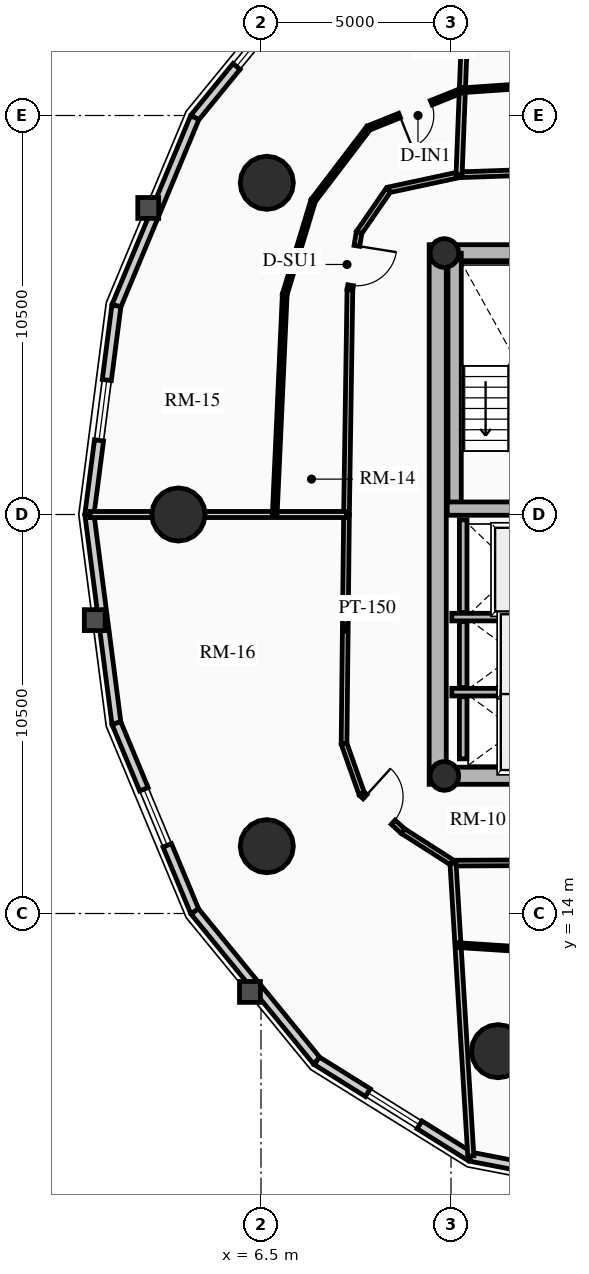
"""IFC4 building model, lengths in metres.
Left out: names, types, materials, properties, quantities, classifications, styles, units other than length and angle.
Written with IfcOpenShell. Run it as: python <this file> out.ifc"""

import sys

from ifc_helpers import new_model, si_unit, direction, frame, frame_2d, origin, origin_2d, place, context, subcontext, project, spatial, rectangle, circle, hollow_circle, extrude, source, transform, mapped, element, fill, save


model = new_model("IFC4")
c1 = context("Model", 3, precision=1e-05, world=origin(), true_north=direction((0.0, 1.0)))
c2 = subcontext(c1, "Body", "Model", "MODEL_VIEW")
j1 = project(units=[si_unit("LENGTHUNIT", "METRE"), si_unit("PLANEANGLEUNIT", "RADIAN")], contexts=[c1])
p1 = place(None, origin())
s1 = spatial("IfcSite", under=j1, at=p1, CompositionType="ELEMENT")
p2 = place(p1, origin())
s2 = spatial("IfcBuilding", under=s1, at=p2, CompositionType="ELEMENT")
p3 = place(p2, frame((0.0, 0.0, 144.04)))
s3 = spatial("IfcBuildingStorey", under=s2, at=p3, CompositionType="ELEMENT", Elevation=144.04)
p4 = place(p3, frame((11.15, 17.4, 0.0), z_axis=(0.0, 0.0, 1.0), x_axis=(0.0, 1.0, 0.0)))
e1 = element("IfcWall", 1, at=p4, inside=s3, PredefinedType="SHEAR", context=c2, shape_type="SweptSolid", body=[
    extrude(rectangle(XDim=14.2, YDim=0.45, at=frame_2d((7.1, 0.0))), origin(), (0.0, 0.0, 1.0), 3.06),
])
p5 = place(p3, frame((11.15, 17.625, 0.0), z_axis=(0.0, 0.0, 1.0), x_axis=(1.0, 0.0, 0.0)))
e2 = element("IfcWall", 2, at=p5, inside=s3, PredefinedType="SHEAR", context=c2, shape_type="SweptSolid", body=[
    extrude(rectangle(XDim=10.7, YDim=0.45, at=frame_2d((5.35, 0.0))), origin(), (0.0, 0.0, 1.0), 3.06),
])
m1 = source(origin(), c2, "Body", "SweptSolid", [
    extrude(rectangle(XDim=1.5, YDim=2.02, at=frame_2d((0.75, 1.01))), frame((0.0, 0.235, 0.0), z_axis=(0.0, -1.0, 0.0), x_axis=(1.0, 0.0, 0.0)), (0.0, 0.0, 1.0), 0.47),
])
p6 = place(p5, frame((5.45, 0.0, 0.0)))
e3 = element("IfcOpeningElement", 3, at=p6, cuts=e2, PredefinedType="OPENING", context=c2, shape_type="MappedRepresentation", body=[
    mapped(m1, transform((0.0, 0.0, 0.0), x_axis=(1.0, 0.0, 0.0), y_axis=(0.0, 1.0, 0.0), z_axis=(0.0, 0.0, 1.0), scale=1.0)),
])
p7 = place(p3, frame((11.15, 31.375, 0.0), z_axis=(0.0, 0.0, 1.0), x_axis=(1.0, 0.0, 0.0)))
e4 = element("IfcWall", 4, at=p7, inside=s3, PredefinedType="SHEAR", context=c2, shape_type="SweptSolid", body=[
    extrude(rectangle(XDim=10.7, YDim=0.45, at=frame_2d((5.35, 0.0))), origin(), (0.0, 0.0, 1.0), 3.06),
])
p8 = place(p7, frame((4.6, 0.0, 0.0)))
e5 = element("IfcOpeningElement", 5, at=p8, cuts=e4, PredefinedType="OPENING", context=c2, shape_type="MappedRepresentation", body=[
    mapped(m1, transform((0.0, 0.0, 0.0), x_axis=(1.0, 0.0, 0.0), y_axis=(0.0, 1.0, 0.0), z_axis=(0.0, 0.0, 1.0), scale=1.0)),
])
p9 = place(p3, frame((11.595, 24.655, 0.0), z_axis=(0.0, 0.0, 1.0), x_axis=(0.0, 1.0, 0.0)))
e6 = element("IfcWall", 6, at=p9, inside=s3, PredefinedType="SHEAR", context=c2, shape_type="SweptSolid", body=[
    extrude(rectangle(XDim=6.72, YDim=0.35, at=frame_2d((3.36, 0.0))), origin(), (0.0, 0.0, 1.0), 3.06),
])
p10 = place(p3, frame((11.4, 24.655, 0.0), z_axis=(0.0, 0.0, 1.0), x_axis=(1.0, 0.0, 0.0)))
e7 = element("IfcWall", 7, at=p10, inside=s3, PredefinedType="SHEAR", context=c2, shape_type="SweptSolid", body=[
    extrude(rectangle(XDim=3.285, YDim=0.35, at=frame_2d((1.643, 0.0))), origin(), (0.0, 0.0, 1.0), 3.06),
])
for number, where, z_axis, x_axis in (
    (8, (11.325, 17.62, 0.0), (0.0, 0.0, 1.0), (1.0, 0.0, 0.0)),
    (9, (11.325, 31.38, 0.0), (0.0, 0.0, 1.0), (1.0, 0.0, 0.0)),
):
    element("IfcColumn", number, at=place(p3, frame(where, z_axis=z_axis, x_axis=x_axis)), inside=s3, PredefinedType="COLUMN", context=c2, shape_type="SweptSolid", body=[
        extrude(hollow_circle(Radius=0.38, WallThickness=0.032, at=origin_2d()), origin(), (0.0, 0.0, 1.0), 3.06),
    ])
for number, where, z_axis, x_axis in (
    (10, (6.653, 33.229, 0.0), (0.0, 0.0, 1.0), (1.0, 0.0, 0.0)),
    (11, (4.328, 24.5, 0.0), (0.0, 0.0, 1.0), (1.0, 0.0, 0.0)),
    (12, (6.653, 15.771, 0.0), (0.0, 0.0, 1.0), (1.0, 0.0, 0.0)),
    (13, (12.739, 10.377, 0.0), (0.0, 0.0, 1.0), (1.0, 0.0, 0.0)),
):
    element("IfcColumn", number, at=place(p3, frame(where, z_axis=z_axis, x_axis=x_axis)), inside=s3, PredefinedType="USERDEFINED", context=c2, shape_type="SweptSolid", body=[
        extrude(circle(Radius=0.7, at=origin_2d()), origin(), (0.0, 0.0, 1.0), 3.06),
    ])
p11 = place(p3, frame((4.757, 34.945, 0.0), z_axis=(0.0, 0.0, 1.0), x_axis=(0.632598524901, 0.774479894053, 0.0)))
e14 = element("IfcWall", 14, at=p11, inside=s3, PredefinedType="SOLIDWALL", context=c2, shape_type="SweptSolid", body=[
    extrude(rectangle(XDim=5.076, YDim=0.24, at=frame_2d((2.538, 0.0))), origin(), (0.0, 0.0, 1.0), 2.229),
])
m2 = source(origin(), c2, "Body", "SweptSolid", [
    extrude(rectangle(XDim=1.6, YDim=1.3, at=frame_2d((0.8, 0.65))), frame((0.0, 0.13, 0.0), z_axis=(0.0, -1.0, 0.0), x_axis=(1.0, 0.0, 0.0)), (0.0, 0.0, 1.0), 0.26),
])
p12 = place(p11, frame((1.738, 0.0, 0.65)))
e15 = element("IfcOpeningElement", 15, at=p12, cuts=e14, PredefinedType="OPENING", context=c2, shape_type="MappedRepresentation", body=[
    mapped(m2, transform((0.0, 0.0, 0.0), x_axis=(1.0, 0.0, 0.0), y_axis=(0.0, 1.0, 0.0), z_axis=(0.0, 0.0, 1.0), scale=1.0)),
])
p13 = place(p3, frame((2.695, 29.991, 0.0), z_axis=(0.0, 0.0, 1.0), x_axis=(0.384259959969, 0.923224936386, 0.0)))
e16 = element("IfcWall", 16, at=p13, inside=s3, PredefinedType="SOLIDWALL", context=c2, shape_type="SweptSolid", body=[
    extrude(rectangle(XDim=5.365, YDim=0.24, at=frame_2d((2.683, 0.0))), origin(), (0.0, 0.0, 1.0), 2.229),
])
p14 = place(p3, frame((1.985, 24.5, 0.0), z_axis=(0.0, 0.0, 1.0), x_axis=(0.128266533912, 0.991739732126, 0.0)))
e17 = element("IfcWall", 17, at=p14, inside=s3, PredefinedType="SOLIDWALL", context=c2, shape_type="SweptSolid", body=[
    extrude(rectangle(XDim=5.537, YDim=0.24, at=frame_2d((2.769, 0.0))), origin(), (0.0, 0.0, 1.0), 2.229),
])
p15 = place(p14, frame((1.968, 0.0, 0.65)))
e18 = element("IfcOpeningElement", 18, at=p15, cuts=e17, PredefinedType="OPENING", context=c2, shape_type="MappedRepresentation", body=[
    mapped(m2, transform((0.0, 0.0, 0.0), x_axis=(1.0, 0.0, 0.0), y_axis=(0.0, 1.0, 0.0), z_axis=(0.0, 0.0, 1.0), scale=1.0)),
])
p16 = place(p3, frame((2.695, 19.009, 0.0), z_axis=(0.0, 0.0, 1.0), x_axis=(-0.128266533912, 0.991739732126, 0.0)))
e19 = element("IfcWall", 19, at=p16, inside=s3, PredefinedType="SOLIDWALL", context=c2, shape_type="SweptSolid", body=[
    extrude(rectangle(XDim=5.537, YDim=0.24, at=frame_2d((2.769, 0.0))), origin(), (0.0, 0.0, 1.0), 2.229),
])
p17 = place(p3, frame((4.757, 14.055, 0.0), z_axis=(0.0, 0.0, 1.0), x_axis=(-0.384259959969, 0.923224936386, 0.0)))
e20 = element("IfcWall", 20, at=p17, inside=s3, PredefinedType="SOLIDWALL", context=c2, shape_type="SweptSolid", body=[
    extrude(rectangle(XDim=5.365, YDim=0.24, at=frame_2d((2.683, 0.0))), origin(), (0.0, 0.0, 1.0), 2.229),
])
p18 = place(p17, frame((1.883, 0.0, 0.65)))
e21 = element("IfcOpeningElement", 21, at=p18, cuts=e20, PredefinedType="OPENING", context=c2, shape_type="MappedRepresentation", body=[
    mapped(m2, transform((0.0, 0.0, 0.0), x_axis=(1.0, 0.0, 0.0), y_axis=(0.0, 1.0, 0.0), z_axis=(0.0, 0.0, 1.0), scale=1.0)),
])
p19 = place(p3, frame((7.968, 10.124, 0.0), z_axis=(0.0, 0.0, 1.0), x_axis=(-0.632598524901, 0.774479894053, 0.0)))
e22 = element("IfcWall", 22, at=p19, inside=s3, PredefinedType="SOLIDWALL", context=c2, shape_type="SweptSolid", body=[
    extrude(rectangle(XDim=5.076, YDim=0.24, at=frame_2d((2.538, 0.0))), origin(), (0.0, 0.0, 1.0), 2.229),
])
p20 = place(p3, frame((12.015, 7.6, 0.0), z_axis=(0.0, 0.0, 1.0), x_axis=(-0.848452391194, 0.529271707044, 0.0)))
e23 = element("IfcWall", 23, at=p20, inside=s3, PredefinedType="SOLIDWALL", context=c2, shape_type="SweptSolid", body=[
    extrude(rectangle(XDim=4.769, YDim=0.24, at=frame_2d((2.385, 0.0))), origin(), (0.0, 0.0, 1.0), 2.229),
])
p21 = place(p20, frame((1.585, 0.0, 0.65)))
e24 = element("IfcOpeningElement", 24, at=p21, cuts=e23, PredefinedType="OPENING", context=c2, shape_type="MappedRepresentation", body=[
    mapped(m2, transform((0.0, 0.0, 0.0), x_axis=(1.0, 0.0, 0.0), y_axis=(0.0, 1.0, 0.0), z_axis=(0.0, 0.0, 1.0), scale=1.0)),
])
p22 = place(p3, frame((16.5, 6.73, 0.0), z_axis=(0.0, 0.0, 1.0), x_axis=(-0.981718699963, 0.190337579429, 0.0)))
e25 = element("IfcWall", 25, at=p22, inside=s3, PredefinedType="SOLIDWALL", context=c2, shape_type="SweptSolid", body=[
    extrude(rectangle(XDim=4.569, YDim=0.24, at=frame_2d((2.284, 0.0))), origin(), (0.0, 0.0, 1.0), 2.229),
])
p23 = place(p22, frame((1.484, 0.0, 0.65)))
e26 = element("IfcOpeningElement", 26, at=p23, cuts=e25, PredefinedType="OPENING", context=c2, shape_type="MappedRepresentation", body=[
    mapped(m2, transform((0.0, 0.0, 0.0), x_axis=(1.0, 0.0, 0.0), y_axis=(0.0, 1.0, 0.0), z_axis=(0.0, 0.0, 1.0), scale=1.0)),
])
p24 = place(p3, frame((11.52, 21.8, 0.0), z_axis=(0.0, 0.0, 1.0), x_axis=(1.0, 0.0, 0.0)))
e27 = element("IfcWall", 27, at=p24, inside=s3, PredefinedType="SHEAR", context=c2, shape_type="SweptSolid", body=[
    extrude(rectangle(XDim=2.97, YDim=0.2, at=frame_2d((1.485, 0.0))), origin(), (0.0, 0.0, 1.0), 3.06),
])
p25 = place(p3, frame((11.82, 21.92, 0.0), z_axis=(0.0, 0.0, 1.0), x_axis=(0.0, 1.0, 0.0)))
e28 = element("IfcWall", 28, at=p25, inside=s3, PredefinedType="SHEAR", context=c2, shape_type="SweptSolid", body=[
    extrude(rectangle(XDim=2.44, YDim=0.2, at=frame_2d((1.22, 0.0))), origin(), (0.0, 0.0, 1.0), 3.06),
])
p26 = place(p3, frame((11.52, 19.825, 0.0), z_axis=(0.0, 0.0, 1.0), x_axis=(1.0, 0.0, 0.0)))
e29 = element("IfcWall", 29, at=p26, inside=s3, PredefinedType="SHEAR", context=c2, shape_type="SweptSolid", body=[
    extrude(rectangle(XDim=2.97, YDim=0.2, at=frame_2d((1.485, 0.0))), origin(), (0.0, 0.0, 1.0), 3.06),
])
p27 = place(p3, frame((11.82, 19.945, 0.0), z_axis=(0.0, 0.0, 1.0), x_axis=(0.0, 1.0, 0.0)))
e30 = element("IfcWall", 30, at=p27, inside=s3, PredefinedType="SHEAR", context=c2, shape_type="SweptSolid", body=[
    extrude(rectangle(XDim=1.735, YDim=0.2, at=frame_2d((0.867, 0.0))), origin(), (0.0, 0.0, 1.0), 3.06),
])
p28 = place(p3, frame((11.82, 18.07, 0.0), z_axis=(0.0, 0.0, 1.0), x_axis=(0.0, 1.0, 0.0)))
e31 = element("IfcWall", 31, at=p28, inside=s3, PredefinedType="SHEAR", context=c2, shape_type="SweptSolid", body=[
    extrude(rectangle(XDim=1.635, YDim=0.2, at=frame_2d((0.817, 0.0))), origin(), (0.0, 0.0, 1.0), 3.06),
])
p29 = place(p3, frame((18.112, 33.659, 0.0), z_axis=(0.0, 0.0, 1.0), x_axis=(-0.999413895918, -0.034232508622, 0.0)))
e32 = element("IfcWall", 32, at=p29, inside=s3, PredefinedType="PARTITIONING", context=c2, shape_type="SweptSolid", body=[
    extrude(rectangle(XDim=6.404, YDim=0.15, at=frame_2d((3.202, 0.0))), origin(), (0.0, 0.0, 1.0), 2.275),
])
p30 = place(p3, frame((11.712, 33.44, 0.0), z_axis=(0.0, 0.0, 1.0), x_axis=(-0.977753514213, -0.209757158265, 0.0)))
e33 = element("IfcWall", 33, at=p30, inside=s3, PredefinedType="PARTITIONING", context=c2, shape_type="SweptSolid", body=[
    extrude(rectangle(XDim=1.901, YDim=0.15, at=frame_2d((0.95, 0.0))), origin(), (0.0, 0.0, 1.0), 2.275),
])
p31 = place(p3, frame((9.853, 33.042, 0.0), z_axis=(0.0, 0.0, 1.0), x_axis=(-0.567189283521, -0.823587467522, 0.0)))
e34 = element("IfcWall", 34, at=p31, inside=s3, PredefinedType="PARTITIONING", context=c2, shape_type="SweptSolid", body=[
    extrude(rectangle(XDim=1.365, YDim=0.15, at=frame_2d((0.682, 0.0))), origin(), (0.0, 0.0, 1.0), 2.275),
])
p32 = place(p3, frame((9.079, 31.918, 0.0), z_axis=(0.0, 0.0, 1.0), x_axis=(-0.15742775293, -0.987530507178, 0.0)))
e35 = element("IfcWall", 35, at=p32, inside=s3, PredefinedType="PARTITIONING", context=c2, shape_type="SweptSolid", body=[
    extrude(rectangle(XDim=1.523, YDim=0.15, at=frame_2d((0.761, 0.0))), origin(), (0.0, 0.0, 1.0), 2.275),
])
m3 = source(origin(), c2, "Body", "SweptSolid", [
    extrude(rectangle(XDim=1.05, YDim=2.015, at=frame_2d((0.525, 1.007))), frame((0.0, 0.085, 0.0), z_axis=(0.0, -1.0, 0.0), x_axis=(1.0, 0.0, 0.0)), (0.0, 0.0, 1.0), 0.17),
])
p33 = place(p32, frame((0.353, 0.0, 0.0)))
e36 = element("IfcOpeningElement", 36, at=p33, cuts=e35, PredefinedType="OPENING", context=c2, shape_type="MappedRepresentation", body=[
    mapped(m3, transform((0.0, 0.0, 0.0), x_axis=(1.0, 0.0, 0.0), y_axis=(0.0, 1.0, 0.0), z_axis=(0.0, 0.0, 1.0), scale=1.0)),
])
p34 = place(p3, frame((8.84, 30.414, 0.0), z_axis=(0.0, 0.0, 1.0), x_axis=(-0.01514915101, -0.999885245027, 0.0)))
e37 = element("IfcWall", 37, at=p34, inside=s3, PredefinedType="PARTITIONING", context=c2, shape_type="SweptSolid", body=[
    extrude(rectangle(XDim=5.915, YDim=0.15, at=frame_2d((2.957, 0.0))), origin(), (0.0, 0.0, 1.0), 2.705),
])
p35 = place(p3, frame((8.75, 24.5, 0.0), z_axis=(0.0, 0.0, 1.0), x_axis=(-0.01076642715, -0.999942040344, 0.0)))
e38 = element("IfcWall", 38, at=p35, inside=s3, PredefinedType="PARTITIONING", context=c2, shape_type="SweptSolid", body=[
    extrude(rectangle(XDim=6.032, YDim=0.15, at=frame_2d((3.016, 0.0))), origin(), (0.0, 0.0, 1.0), 2.275),
])
p36 = place(p3, frame((8.685, 18.469, 0.0), z_axis=(0.0, 0.0, 1.0), x_axis=(0.333415749461, -0.942779899028, 0.0)))
e39 = element("IfcWall", 39, at=p36, inside=s3, PredefinedType="PARTITIONING", context=c2, shape_type="SweptSolid", body=[
    extrude(rectangle(XDim=1.394, YDim=0.15, at=frame_2d((0.697, 0.0))), origin(), (0.0, 0.0, 1.0), 2.275),
])
p37 = place(p3, frame((9.15, 17.155, 0.0), z_axis=(0.0, 0.0, 1.0), x_axis=(0.740451494731, -0.672109800517, 0.0)))
e40 = element("IfcWall", 40, at=p37, inside=s3, PredefinedType="PARTITIONING", context=c2, shape_type="SweptSolid", body=[
    extrude(rectangle(XDim=1.468, YDim=0.15, at=frame_2d((0.734, 0.0))), origin(), (0.0, 0.0, 1.0), 2.275),
])
m4 = source(origin(), c2, "Body", "SweptSolid", [
    extrude(rectangle(XDim=1.0, YDim=2.015, at=frame_2d((0.5, 1.007))), frame((0.0, 0.085, 0.0), z_axis=(0.0, -1.0, 0.0), x_axis=(1.0, 0.0, 0.0)), (0.0, 0.0, 1.0), 0.17),
])
p38 = place(p37, frame((0.12, 0.0, 0.0)))
e41 = element("IfcOpeningElement", 41, at=p38, cuts=e40, PredefinedType="OPENING", context=c2, shape_type="MappedRepresentation", body=[
    mapped(m4, transform((0.0, 0.0, 0.0), x_axis=(1.0, 0.0, 0.0), y_axis=(0.0, 1.0, 0.0), z_axis=(0.0, 0.0, 1.0), scale=1.0)),
])
p39 = place(p3, frame((10.237, 16.168, 0.0), z_axis=(0.0, 0.0, 1.0), x_axis=(0.842061223587, -0.53938195718, 0.0)))
e42 = element("IfcWall", 42, at=p39, inside=s3, PredefinedType="PARTITIONING", context=c2, shape_type="SweptSolid", body=[
    extrude(rectangle(XDim=1.562, YDim=0.15, at=frame_2d((0.781, 0.0))), origin(), (0.0, 0.0, 1.0), 2.275),
])
p40 = place(p3, frame((11.552, 15.326, 0.0), z_axis=(0.0, 0.0, 1.0), x_axis=(0.999989573465, 0.004566504266, 0.0)))
e43 = element("IfcWall", 43, at=p40, inside=s3, PredefinedType="PARTITIONING", context=c2, shape_type="SweptSolid", body=[
    extrude(rectangle(XDim=3.261, YDim=0.15, at=frame_2d((1.631, 0.0))), origin(), (0.0, 0.0, 1.0), 2.275),
])
p41 = place(p3, frame((11.712, 33.44, 0.0), z_axis=(0.0, 0.0, 1.0), x_axis=(0.038892064024, 0.999243417469, 0.0)))
e44 = element("IfcWall", 44, at=p41, inside=s3, PredefinedType="PARTITIONING", context=c2, shape_type="SweptSolid", body=[
    extrude(rectangle(XDim=7.947, YDim=0.16, at=frame_2d((3.974, 0.0))), origin(), (0.0, 0.0, 1.0), 2.229),
])
p42 = place(p3, frame((8.75, 24.5, 0.0), z_axis=(0.0, 0.0, 1.0), x_axis=(-1.0, 0.0, 0.0)))
e45 = element("IfcWall", 45, at=p42, inside=s3, PredefinedType="PARTITIONING", context=c2, shape_type="SweptSolid", body=[
    extrude(rectangle(XDim=6.745, YDim=0.16, at=frame_2d((3.373, 0.0))), origin(), (0.0, 0.0, 1.0), 2.229),
])
p43 = place(p3, frame((11.552, 15.326, 0.0), z_axis=(0.0, 0.0, 1.0), x_axis=(0.060740403573, -0.998153597085, 0.0)))
e46 = element("IfcWall", 46, at=p43, inside=s3, PredefinedType="PARTITIONING", context=c2, shape_type="SweptSolid", body=[
    extrude(rectangle(XDim=7.721, YDim=0.16, at=frame_2d((3.861, 0.0))), origin(), (0.0, 0.0, 1.0), 2.229),
])
p44 = place(p3, frame((17.661, 36.065, 0.0), z_axis=(0.0, 0.0, 1.0), x_axis=(-0.997670473363, -0.068217494681, 0.0)))
e47 = element("IfcWall", 47, at=p44, inside=s3, PredefinedType="PARTITIONING", context=c2, shape_type="SweptSolid", body=[
    extrude(rectangle(XDim=5.876, YDim=0.125, at=frame_2d((2.938, 0.0))), origin(), (0.0, 0.0, 1.0), 2.275),
])
p45 = place(p3, frame((11.798, 35.664, 0.0), z_axis=(0.0, 0.0, 1.0), x_axis=(-0.927779230796, -0.37312960068, 0.0)))
e48 = element("IfcWall", 48, at=p45, inside=s3, PredefinedType="PARTITIONING", context=c2, shape_type="SweptSolid", body=[
    extrude(rectangle(XDim=2.662, YDim=0.125, at=frame_2d((1.331, 0.0))), origin(), (0.0, 0.0, 1.0), 2.275),
])
m5 = source(origin(), c2, "Body", "SweptSolid", [
    extrude(rectangle(XDim=0.9, YDim=2.005, at=frame_2d((0.45, 1.002))), frame((0.0, 0.073, 0.0), z_axis=(0.0, -1.0, 0.0), x_axis=(1.0, 0.0, 0.0)), (0.0, 0.0, 1.0), 0.145),
])
p46 = place(p45, frame((0.881, 0.0, 0.0)))
e49 = element("IfcOpeningElement", 49, at=p46, cuts=e48, PredefinedType="OPENING", context=c2, shape_type="MappedRepresentation", body=[
    mapped(m5, transform((0.0, 0.0, 0.0), x_axis=(1.0, 0.0, 0.0), y_axis=(0.0, 1.0, 0.0), z_axis=(0.0, 0.0, 1.0), scale=1.0)),
])
p47 = place(p3, frame((9.329, 34.671, 0.0), z_axis=(0.0, 0.0, 1.0), x_axis=(-0.606312904513, -0.795226170231, 0.0)))
e50 = element("IfcWall", 50, at=p47, inside=s3, PredefinedType="PARTITIONING", context=c2, shape_type="SweptSolid", body=[
    extrude(rectangle(XDim=2.4, YDim=0.125, at=frame_2d((1.2, 0.0))), origin(), (0.0, 0.0, 1.0), 2.275),
])
p48 = place(p3, frame((7.874, 32.762, 0.0), z_axis=(0.0, 0.0, 1.0), x_axis=(-0.290359355154, -0.956917679257, 0.0)))
e51 = element("IfcWall", 51, at=p48, inside=s3, PredefinedType="PARTITIONING", context=c2, shape_type="SweptSolid", body=[
    extrude(rectangle(XDim=2.58, YDim=0.125, at=frame_2d((1.29, 0.0))), origin(), (0.0, 0.0, 1.0), 2.275),
])
p49 = place(p3, frame((7.125, 30.294, 0.0), z_axis=(0.0, 0.0, 1.0), x_axis=(-0.045379018557, -0.998969841724, 0.0)))
e52 = element("IfcWall", 52, at=p49, inside=s3, PredefinedType="PARTITIONING", context=c2, shape_type="SweptSolid", body=[
    extrude(rectangle(XDim=5.8, YDim=0.125, at=frame_2d((2.9, 0.0))), origin(), (0.0, 0.0, 1.0), 2.705),
])
p50 = place(p3, frame((11.683, 13.168, 0.0), z_axis=(0.0, 0.0, 1.0), x_axis=(0.997925028615, -0.06438662333, 0.0)))
e53 = element("IfcWall", 53, at=p50, inside=s3, PredefinedType="PARTITIONING", context=c2, shape_type="SweptSolid", body=[
    extrude(rectangle(XDim=3.61, YDim=0.125, at=frame_2d((1.805, 0.0))), origin(), (0.0, 0.0, 1.0), 2.275),
])
m6 = source(origin(), c2, "Body", "SweptSolid", [
    extrude(rectangle(XDim=1.6, YDim=1.3, at=frame_2d((0.8, 0.65))), frame((0.0, 0.03, 0.0), z_axis=(0.0, -1.0, 0.0), x_axis=(1.0, 0.0, 0.0)), (0.0, 0.0, 1.0), 0.06),
])
p51 = place(p12, origin())
e54 = element("IfcWindow", 54, at=p51, inside=s3, PartitioningType="SINGLE_PANEL", PredefinedType="WINDOW", context=c2, shape_type="MappedRepresentation", body=[
    mapped(m6, transform((0.0, 0.0, 0.0), x_axis=(1.0, 0.0, 0.0), y_axis=(0.0, 1.0, 0.0), z_axis=(0.0, 0.0, 1.0), scale=1.0)),
])
fill(e15, e54)
p52 = place(p15, origin())
e55 = element("IfcWindow", 55, at=p52, inside=s3, PartitioningType="SINGLE_PANEL", PredefinedType="WINDOW", context=c2, shape_type="MappedRepresentation", body=[
    mapped(m6, transform((0.0, 0.0, 0.0), x_axis=(1.0, 0.0, 0.0), y_axis=(0.0, 1.0, 0.0), z_axis=(0.0, 0.0, 1.0), scale=1.0)),
])
fill(e18, e55)
p53 = place(p18, origin())
e56 = element("IfcWindow", 56, at=p53, inside=s3, PartitioningType="SINGLE_PANEL", PredefinedType="WINDOW", context=c2, shape_type="MappedRepresentation", body=[
    mapped(m6, transform((0.0, 0.0, 0.0), x_axis=(1.0, 0.0, 0.0), y_axis=(0.0, 1.0, 0.0), z_axis=(0.0, 0.0, 1.0), scale=1.0)),
])
fill(e21, e56)
p54 = place(p21, origin())
e57 = element("IfcWindow", 57, at=p54, inside=s3, PartitioningType="SINGLE_PANEL", PredefinedType="WINDOW", context=c2, shape_type="MappedRepresentation", body=[
    mapped(m6, transform((0.0, 0.0, 0.0), x_axis=(1.0, 0.0, 0.0), y_axis=(0.0, 1.0, 0.0), z_axis=(0.0, 0.0, 1.0), scale=1.0)),
])
fill(e24, e57)
m7 = source(origin(), c2, "Body", "SweptSolid", [
    extrude(rectangle(XDim=1.05, YDim=2.015, at=frame_2d((0.525, 1.007))), frame((0.0, 0.025, 0.0), z_axis=(0.0, -1.0, 0.0), x_axis=(1.0, 0.0, 0.0)), (0.0, 0.0, 1.0), 0.05),
])
p55 = place(p33, origin())
e58 = element("IfcDoor", 58, at=p55, inside=s3, OperationType="SINGLE_SWING_LEFT", PredefinedType="DOOR", context=c2, shape_type="MappedRepresentation", body=[
    mapped(m7, transform((0.0, 0.0, 0.0), x_axis=(1.0, 0.0, 0.0), y_axis=(0.0, 1.0, 0.0), z_axis=(0.0, 0.0, 1.0), scale=1.0)),
])
fill(e36, e58)
m8 = source(origin(), c2, "Body", "SweptSolid", [
    extrude(rectangle(XDim=0.9, YDim=2.005, at=frame_2d((0.45, 1.002))), frame((0.0, 0.025, 0.0), z_axis=(0.0, -1.0, 0.0), x_axis=(1.0, 0.0, 0.0)), (0.0, 0.0, 1.0), 0.05),
])
p56 = place(p46, origin())
e59 = element("IfcDoor", 59, at=p56, inside=s3, OperationType="SINGLE_SWING_RIGHT", PredefinedType="DOOR", context=c2, shape_type="MappedRepresentation", body=[
    mapped(m8, transform((0.0, 0.0, 0.0), x_axis=(1.0, 0.0, 0.0), y_axis=(0.0, 1.0, 0.0), z_axis=(0.0, 0.0, 1.0), scale=1.0)),
])
fill(e49, e59)
m9 = source(origin(), c2, "Body", "SweptSolid", [
    extrude(rectangle(XDim=1.0, YDim=2.015, at=frame_2d((0.5, 1.007))), frame((0.0, 0.025, 0.0), z_axis=(0.0, -1.0, 0.0), x_axis=(1.0, 0.0, 0.0)), (0.0, 0.0, 1.0), 0.05),
])
p57 = place(p38, origin())
e60 = element("IfcDoor", 60, at=p57, inside=s3, OperationType="SINGLE_SWING_LEFT", PredefinedType="DOOR", context=c2, shape_type="MappedRepresentation", body=[
    mapped(m9, transform((0.0, 0.0, 0.0), x_axis=(1.0, 0.0, 0.0), y_axis=(0.0, 1.0, 0.0), z_axis=(0.0, 0.0, 1.0), scale=1.0)),
])
fill(e41, e60)
save(model, sys.argv[1])
